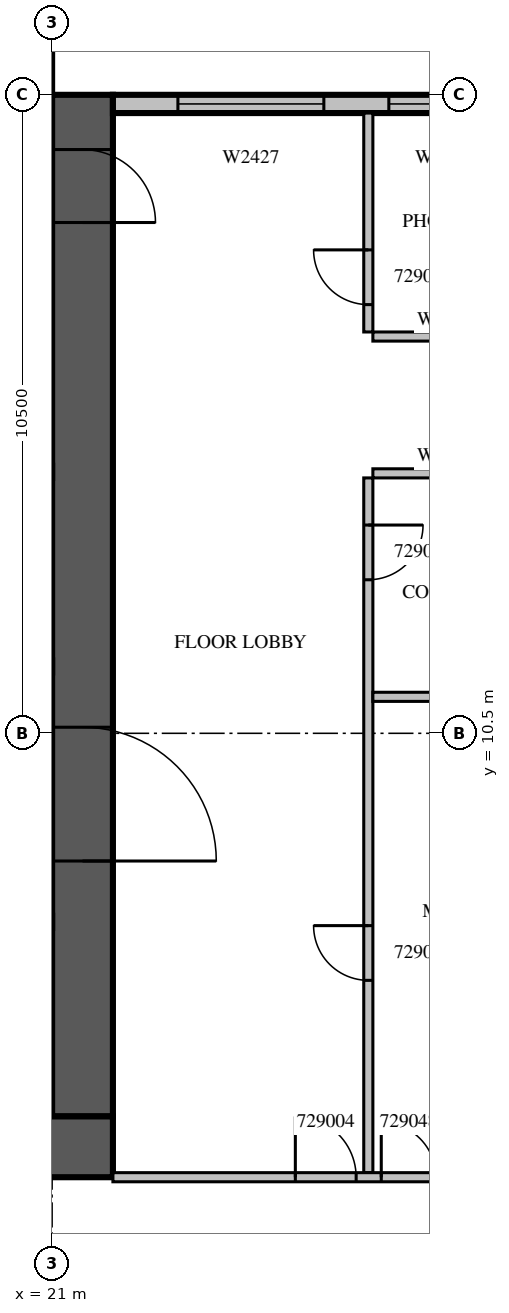
"""IFC4 building model, lengths in metres.
Left out: names, types, materials, properties, quantities, classifications, styles, units other than length and angle.
Written with IfcOpenShell. Run it as: python <this file> out.ifc"""

import sys

from ifc_helpers import new_model, si_unit, direction, frame, frame_2d, origin, place, context, subcontext, project, spatial, rectangle, extrude, source, transform, mapped, element, fill, save


model = new_model("IFC4")
c1 = context("Model", 3, precision=1e-05, world=origin(), true_north=direction((0.0, 1.0)))
c2 = subcontext(c1, "Body", "Model", "MODEL_VIEW")
j1 = project(units=[si_unit("LENGTHUNIT", "METRE"), si_unit("PLANEANGLEUNIT", "RADIAN")], contexts=[c1])
p1 = place(None, origin())
s1 = spatial("IfcSite", under=j1, at=p1, CompositionType="ELEMENT")
p2 = place(p1, origin())
s2 = spatial("IfcBuilding", under=s1, at=p2, CompositionType="ELEMENT")
p3 = place(p2, frame((0.0, 0.0, 132.9)))
s3 = spatial("IfcBuildingStorey", under=s2, at=p3, CompositionType="ELEMENT", Elevation=132.9)
m1 = source(origin(), c2, "Body", "SweptSolid", [
    extrude(rectangle(XDim=16.8, YDim=1.0, at=frame_2d((8.4, 0.0))), origin(), (0.0, 0.0, 1.0), 4.2),
])
p4 = place(p3, frame((21.5, 4.2, 0.0), z_axis=(0.0, 0.0, 1.0), x_axis=(0.0, 1.0, 0.0)))
e1 = element("IfcWall", 1, at=p4, inside=s3, PredefinedType="SHEAR", context=c2, shape_type="MappedRepresentation", body=[
    mapped(m1, transform((0.0, 0.0, 0.0), scale=1.0)),
])
m2 = source(origin(), c2, "Body", "SweptSolid", [
    extrude(rectangle(XDim=2.2, YDim=2.1, at=frame_2d((1.1, 1.05))), frame((0.0, 0.51, 0.0), z_axis=(0.0, -1.0, 0.0), x_axis=(1.0, 0.0, 0.0)), (0.0, 0.0, 1.0), 1.02),
])
p5 = place(p4, frame((4.2, 0.0, 0.0)))
e2 = element("IfcOpeningElement", 2, at=p5, cuts=e1, PredefinedType="OPENING", context=c2, shape_type="MappedRepresentation", body=[
    mapped(m2, transform((0.0, 0.0, 0.0), scale=1.0)),
])
m3 = source(origin(), c2, "Body", "SweptSolid", [
    extrude(rectangle(XDim=1.2, YDim=2.1, at=frame_2d((0.6, 1.05))), frame((0.0, 0.51, 0.0), z_axis=(0.0, -1.0, 0.0), x_axis=(1.0, 0.0, 0.0)), (0.0, 0.0, 1.0), 1.02),
])
p6 = place(p4, frame((14.7, 0.0, 0.0)))
e3 = element("IfcOpeningElement", 3, at=p6, cuts=e1, PredefinedType="OPENING", context=c2, shape_type="MappedRepresentation", body=[
    mapped(m3, transform((0.0, 0.0, 0.0), scale=1.0)),
])
m4 = source(origin(), c2, "Body", "SweptSolid", [
    extrude(rectangle(XDim=17.8, YDim=1.0, at=frame_2d((8.9, 0.0))), origin(), (0.0, 0.0, 1.0), 4.2),
])
p7 = place(p3, frame((4.2, 3.7, 0.0), z_axis=(0.0, 0.0, 1.0), x_axis=(1.0, 0.0, 0.0)))
e4 = element("IfcWall", 4, at=p7, inside=s3, PredefinedType="SHEAR", context=c2, shape_type="MappedRepresentation", body=[
    mapped(m4, transform((0.0, 0.0, 0.0), scale=1.0)),
])
m5 = source(origin(), c2, "Body", "SweptSolid", [
    extrude(rectangle(XDim=6.875, YDim=0.3, at=frame_2d((3.438, 0.0))), origin(), (0.0, 0.0, 1.0), 3.8),
])
p8 = place(p3, frame((28.875, 20.85, 0.0), z_axis=(0.0, 0.0, 1.0), x_axis=(-1.0, 0.0, 0.0)))
e5 = element("IfcWall", 5, at=p8, inside=s3, PredefinedType="STANDARD", context=c2, shape_type="MappedRepresentation", body=[
    mapped(m5, transform((0.0, 0.0, 0.0), scale=1.0)),
])
m6 = source(origin(), c2, "Body", "SweptSolid", [
    extrude(rectangle(XDim=1.8, YDim=2.7, at=frame_2d((0.9, 1.35))), frame((0.0, 0.16, 0.0), z_axis=(0.0, -1.0, 0.0), x_axis=(1.0, 0.0, 0.0)), (0.0, 0.0, 1.0), 0.32),
])
p9 = place(p8, frame((0.537, 0.0, 0.6)))
e6 = element("IfcOpeningElement", 6, at=p9, cuts=e5, PredefinedType="OPENING", context=c2, shape_type="MappedRepresentation", body=[
    mapped(m6, transform((0.0, 0.0, 0.0), scale=1.0)),
])
m7 = source(origin(), c2, "Body", "SweptSolid", [
    extrude(rectangle(XDim=2.4, YDim=2.7, at=frame_2d((1.2, 1.35))), frame((0.0, 0.16, 0.0), z_axis=(0.0, -1.0, 0.0), x_axis=(1.0, 0.0, 0.0)), (0.0, 0.0, 1.0), 0.32),
])
p10 = place(p8, frame((3.406, 0.0, 0.6)))
e7 = element("IfcOpeningElement", 7, at=p10, cuts=e5, PredefinedType="OPENING", context=c2, shape_type="MappedRepresentation", body=[
    mapped(m7, transform((0.0, 0.0, 0.0), scale=1.0)),
])
m8 = source(origin(), c2, "Body", "SweptSolid", [
    extrude(rectangle(XDim=11.425, YDim=0.15, at=frame_2d((5.713, 0.0))), origin(), (0.0, 0.0, 1.0), 3.8),
])
p11 = place(p3, frame((26.2, 14.7, 0.0), z_axis=(0.0, 0.0, 1.0), x_axis=(0.0, -1.0, 0.0)))
e8 = element("IfcWall", 8, at=p11, inside=s3, PredefinedType="PARTITIONING", context=c2, shape_type="MappedRepresentation", body=[
    mapped(m8, transform((0.0, 0.0, 0.0), scale=1.0)),
])
m9 = source(origin(), c2, "Body", "SweptSolid", [
    extrude(rectangle(XDim=0.9, YDim=2.1, at=frame_2d((0.45, 1.05))), frame((0.0, 0.085, 0.0), z_axis=(0.0, -1.0, 0.0), x_axis=(1.0, 0.0, 0.0)), (0.0, 0.0, 1.0), 0.17),
])
p12 = place(p11, frame((7.362, 0.0, 0.0)))
e9 = element("IfcOpeningElement", 9, at=p12, cuts=e8, PredefinedType="OPENING", context=c2, shape_type="MappedRepresentation", body=[
    mapped(m9, transform((0.0, 0.0, 0.0), scale=1.0)),
])
p13 = place(p11, frame((0.775, 0.0, 0.0)))
e10 = element("IfcOpeningElement", 10, at=p13, cuts=e8, PredefinedType="OPENING", context=c2, shape_type="MappedRepresentation", body=[
    mapped(m9, transform((0.0, 0.0, 0.0), scale=1.0)),
])
m10 = source(origin(), c2, "Body", "SweptSolid", [
    extrude(rectangle(XDim=3.6, YDim=0.15, at=frame_2d((1.8, 0.0))), origin(), (0.0, 0.0, 1.0), 3.8),
])
p14 = place(p3, frame((26.2, 20.7, 0.0), z_axis=(0.0, 0.0, 1.0), x_axis=(0.0, -1.0, 0.0)))
e11 = element("IfcWall", 11, at=p14, inside=s3, PredefinedType="PARTITIONING", context=c2, shape_type="MappedRepresentation", body=[
    mapped(m10, transform((0.0, 0.0, 0.0), scale=1.0)),
])
p15 = place(p14, frame((2.25, 0.0, 0.0)))
e12 = element("IfcOpeningElement", 12, at=p15, cuts=e11, PredefinedType="OPENING", context=c2, shape_type="MappedRepresentation", body=[
    mapped(m9, transform((0.0, 0.0, 0.0), scale=1.0)),
])
m11 = source(origin(), c2, "Body", "SweptSolid", [
    extrude(rectangle(XDim=3.05, YDim=0.15, at=frame_2d((1.525, 0.0))), origin(), (0.0, 0.0, 1.0), 3.8),
])
for number, where, z_axis, x_axis in (
    (13, (29.325, 11.1, 0.0), (0.0, 0.0, 1.0), (-1.0, 0.0, 0.0)),
    (14, (29.325, 14.775, 0.0), (0.0, 0.0, 1.0), (-1.0, 0.0, 0.0)),
    (15, (26.275, 17.025, 0.0), (0.0, 0.0, 1.0), (1.0, 0.0, 0.0)),
):
    element("IfcWall", number, at=place(p3, frame(where, z_axis=z_axis, x_axis=x_axis)), inside=s3, PredefinedType="PARTITIONING", context=c2, shape_type="MappedRepresentation", body=[
        mapped(m11, transform((0.0, 0.0, 0.0), scale=1.0)),
    ])
m12 = source(origin(), c2, "Body", "SweptSolid", [
    extrude(rectangle(XDim=7.325, YDim=0.15, at=frame_2d((3.663, 0.0))), origin(), (0.0, 0.0, 1.0), 3.8),
])
p16 = place(p3, frame((22.0, 3.2, 0.0), z_axis=(0.0, 0.0, 1.0), x_axis=(1.0, 0.0, 0.0)))
e16 = element("IfcWall", 16, at=p16, inside=s3, PredefinedType="PARTITIONING", context=c2, shape_type="MappedRepresentation", body=[
    mapped(m12, transform((0.0, 0.0, 0.0), scale=1.0)),
])
m13 = source(origin(), c2, "Body", "SweptSolid", [
    extrude(rectangle(XDim=1.0, YDim=2.1, at=frame_2d((0.5, 1.05))), frame((0.0, 0.085, 0.0), z_axis=(0.0, -1.0, 0.0), x_axis=(1.0, 0.0, 0.0)), (0.0, 0.0, 1.0), 0.17),
])
p17 = place(p16, frame((3.0, 0.0, 0.0)))
e17 = element("IfcOpeningElement", 17, at=p17, cuts=e16, PredefinedType="OPENING", context=c2, shape_type="MappedRepresentation", body=[
    mapped(m13, transform((0.0, 0.0, 0.0), scale=1.0)),
])
p18 = place(p16, frame((4.413, 0.0, 0.0)))
e18 = element("IfcOpeningElement", 18, at=p18, cuts=e16, PredefinedType="OPENING", context=c2, shape_type="MappedRepresentation", body=[
    mapped(m9, transform((0.0, 0.0, 0.0), scale=1.0)),
])
m14 = source(origin(), c2, "Body", "SweptSolid", [
    extrude(rectangle(XDim=1.8, YDim=2.7, at=frame_2d((0.9, 1.35))), frame((0.0, 0.03, 0.0), z_axis=(0.0, -1.0, 0.0), x_axis=(1.0, 0.0, 0.0)), (0.0, 0.0, 1.0), 0.06),
])
p19 = place(p9, origin())
e19 = element("IfcWindow", 19, at=p19, inside=s3, PartitioningType="SINGLE_PANEL", PredefinedType="WINDOW", context=c2, shape_type="MappedRepresentation", body=[
    mapped(m14, transform((0.0, 0.0, 0.0), scale=1.0)),
])
fill(e6, e19)
m15 = source(origin(), c2, "Body", "SweptSolid", [
    extrude(rectangle(XDim=2.4, YDim=2.7, at=frame_2d((1.2, 1.35))), frame((0.0, 0.03, 0.0), z_axis=(0.0, -1.0, 0.0), x_axis=(1.0, 0.0, 0.0)), (0.0, 0.0, 1.0), 0.06),
])
p20 = place(p10, origin())
e20 = element("IfcWindow", 20, at=p20, inside=s3, PartitioningType="SINGLE_PANEL", PredefinedType="WINDOW", context=c2, shape_type="MappedRepresentation", body=[
    mapped(m15, transform((0.0, 0.0, 0.0), scale=1.0)),
])
fill(e7, e20)
m16 = source(origin(), c2, "Body", "SweptSolid", [
    extrude(rectangle(XDim=2.2, YDim=2.1, at=frame_2d((1.1, 1.05))), frame((0.0, 0.025, 0.0), z_axis=(0.0, -1.0, 0.0), x_axis=(1.0, 0.0, 0.0)), (0.0, 0.0, 1.0), 0.05),
])
p21 = place(p5, origin())
e21 = element("IfcDoor", 21, at=p21, inside=s3, OperationType="DOUBLE_DOOR_SINGLE_SWING", PredefinedType="DOOR", context=c2, shape_type="MappedRepresentation", body=[
    mapped(m16, transform((0.0, 0.0, 0.0), scale=1.0)),
])
fill(e2, e21)
m17 = source(origin(), c2, "Body", "SweptSolid", [
    extrude(rectangle(XDim=1.2, YDim=2.1, at=frame_2d((0.6, 1.05))), frame((0.0, 0.025, 0.0), z_axis=(0.0, -1.0, 0.0), x_axis=(1.0, 0.0, 0.0)), (0.0, 0.0, 1.0), 0.05),
])
p22 = place(p6, origin())
e22 = element("IfcDoor", 22, at=p22, inside=s3, OperationType="SINGLE_SWING_RIGHT", PredefinedType="DOOR", context=c2, shape_type="MappedRepresentation", body=[
    mapped(m17, transform((0.0, 0.0, 0.0), scale=1.0)),
])
fill(e3, e22)
m18 = source(origin(), c2, "Body", "SweptSolid", [
    extrude(rectangle(XDim=0.9, YDim=2.1, at=frame_2d((0.45, 1.05))), frame((0.0, 0.025, 0.0), z_axis=(0.0, -1.0, 0.0), x_axis=(1.0, 0.0, 0.0)), (0.0, 0.0, 1.0), 0.05),
])
p23 = place(p12, origin())
e23 = element("IfcDoor", 23, at=p23, inside=s3, OperationType="SINGLE_SWING_RIGHT", PredefinedType="DOOR", context=c2, shape_type="MappedRepresentation", body=[
    mapped(m18, transform((0.0, 0.0, 0.0), scale=1.0)),
])
fill(e9, e23)
p24 = place(p13, origin())
e24 = element("IfcDoor", 24, at=p24, inside=s3, OperationType="SINGLE_SWING_LEFT", PredefinedType="DOOR", context=c2, shape_type="MappedRepresentation", body=[
    mapped(m18, transform((0.0, 0.0, 0.0), scale=1.0)),
])
fill(e10, e24)
p25 = place(p15, origin())
e25 = element("IfcDoor", 25, at=p25, inside=s3, OperationType="SINGLE_SWING_RIGHT", PredefinedType="DOOR", context=c2, shape_type="MappedRepresentation", body=[
    mapped(m18, transform((0.0, 0.0, 0.0), scale=1.0)),
])
fill(e12, e25)
m19 = source(origin(), c2, "Body", "SweptSolid", [
    extrude(rectangle(XDim=1.0, YDim=2.1, at=frame_2d((0.5, 1.05))), frame((0.0, 0.025, 0.0), z_axis=(0.0, -1.0, 0.0), x_axis=(1.0, 0.0, 0.0)), (0.0, 0.0, 1.0), 0.05),
])
p26 = place(p17, origin())
e26 = element("IfcDoor", 26, at=p26, inside=s3, OperationType="SINGLE_SWING_LEFT", PredefinedType="DOOR", context=c2, shape_type="MappedRepresentation", body=[
    mapped(m19, transform((0.0, 0.0, 0.0), scale=1.0)),
])
fill(e17, e26)
p27 = place(p18, origin())
e27 = element("IfcDoor", 27, at=p27, inside=s3, OperationType="SINGLE_SWING_LEFT", PredefinedType="DOOR", context=c2, shape_type="MappedRepresentation", body=[
    mapped(m18, transform((0.0, 0.0, 0.0), scale=1.0)),
])
fill(e18, e27)
save(model, sys.argv[1])
